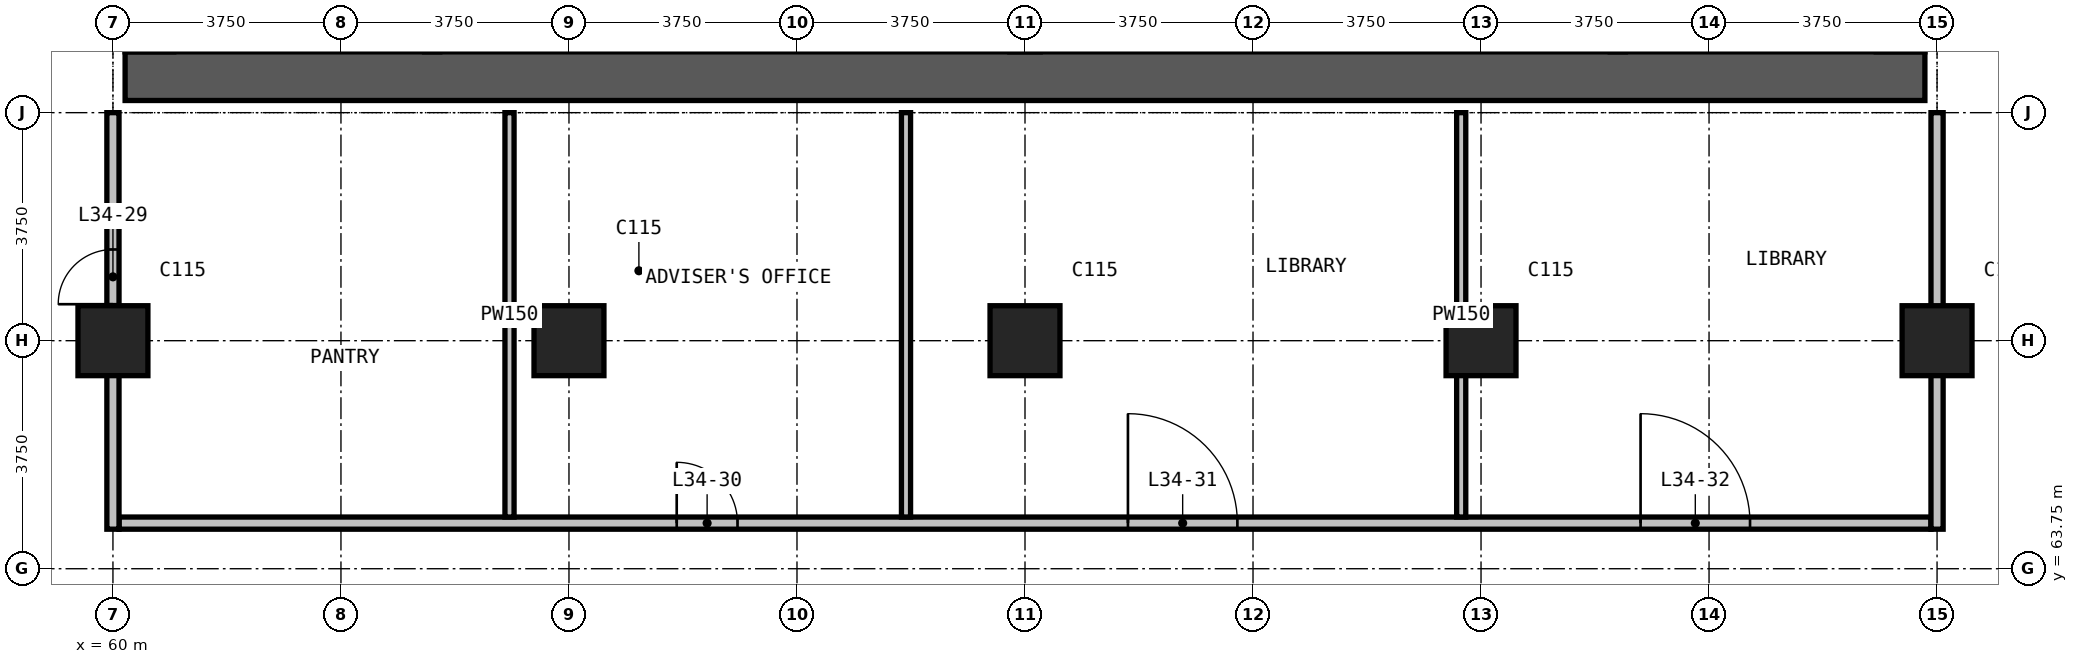
"""IFC4 building model, lengths in metres.
Left out: names, types, materials, properties, quantities, classifications, styles, units other than length and angle.
Written with IfcOpenShell. Run it as: python <this file> out.ifc"""

import sys

from ifc_helpers import new_model, si_unit, direction, frame, frame_2d, origin, origin_2d, place, context, subcontext, project, spatial, rectangle, extrude, element, fill, save


model = new_model("IFC4")
c1 = context("Model", 3, precision=1e-05, world=origin(), true_north=direction((0.0, 1.0)))
c2 = subcontext(c1, "Body", "Model", "MODEL_VIEW")
j1 = project(units=[si_unit("LENGTHUNIT", "METRE"), si_unit("PLANEANGLEUNIT", "RADIAN")], contexts=[c1])
p1 = place(None, origin())
s1 = spatial("IfcSite", under=j1, at=p1, CompositionType="ELEMENT")
p2 = place(p1, origin())
s2 = spatial("IfcBuilding", under=s1, at=p2, CompositionType="ELEMENT")
p3 = place(p2, frame((0.0, 0.0, 136.0)))
s3 = spatial("IfcBuildingStorey", under=s2, at=p3, CompositionType="ELEMENT", Elevation=136.0)
for number, where, z_axis, x_axis in (
    (1, (60.0, 67.5, 0.0), (0.0, 0.0, 1.0), (1.0, 0.0, 0.0)),
    (2, (67.5, 67.5, 0.0), (0.0, 0.0, 1.0), (1.0, 0.0, 0.0)),
    (3, (75.0, 67.5, 0.0), (0.0, 0.0, 1.0), (1.0, 0.0, 0.0)),
    (4, (82.5, 67.5, 0.0), (0.0, 0.0, 1.0), (1.0, 0.0, 0.0)),
    (5, (90.0, 67.5, 0.0), (0.0, 0.0, 1.0), (1.0, 0.0, 0.0)),
):
    element("IfcColumn", number, at=place(p3, frame(where, z_axis=z_axis, x_axis=x_axis)), inside=s3, PredefinedType="COLUMN", context=c2, shape_type="SweptSolid", body=[
        extrude(rectangle(XDim=1.15, YDim=1.15, at=origin_2d()), origin(), (0.0, 0.0, 1.0), 3.6),
    ])
p4 = place(p3, frame((60.2, 71.85, 0.0), z_axis=(0.0, 0.0, 1.0), x_axis=(1.0, 0.0, 0.0)))
e6 = element("IfcWall", 6, at=p4, inside=s3, PredefinedType="SHEAR", context=c2, shape_type="SweptSolid", body=[
    extrude(rectangle(XDim=29.6, YDim=0.8, at=frame_2d((14.8, 0.0))), origin(), (0.0, 0.0, 1.0), 3.6),
])
p5 = place(p3, frame((60.1, 64.5, 0.0), z_axis=(0.0, 0.0, 1.0), x_axis=(1.0, 0.0, 0.0)))
e7 = element("IfcWall", 7, at=p5, inside=s3, PredefinedType="PARTITIONING", context=c2, shape_type="SweptSolid", body=[
    extrude(rectangle(XDim=29.8, YDim=0.2, at=frame_2d((14.9, 0.0))), origin(), (0.0, 0.0, 1.0), 3.3),
])
p6 = place(p5, frame((9.172, 0.0, 0.0)))
e8 = element("IfcOpeningElement", 8, at=p6, cuts=e7, PredefinedType="OPENING", context=c2, shape_type="SweptSolid", body=[
    extrude(rectangle(XDim=1.0, YDim=2.2, at=frame_2d((0.5, 1.1))), frame((0.0, 0.11, 0.0), z_axis=(0.0, -1.0, 0.0), x_axis=(1.0, 0.0, 0.0)), (0.0, 0.0, 1.0), 0.22),
])
p7 = place(p5, frame((16.593, 0.0, 0.0)))
e9 = element("IfcOpeningElement", 9, at=p7, cuts=e7, PredefinedType="OPENING", context=c2, shape_type="SweptSolid", body=[
    extrude(rectangle(XDim=1.8, YDim=2.2, at=frame_2d((0.9, 1.1))), frame((0.0, 0.11, 0.0), z_axis=(0.0, -1.0, 0.0), x_axis=(1.0, 0.0, 0.0)), (0.0, 0.0, 1.0), 0.22),
])
p8 = place(p5, frame((25.024, 0.0, 0.0)))
e10 = element("IfcOpeningElement", 10, at=p8, cuts=e7, PredefinedType="OPENING", context=c2, shape_type="SweptSolid", body=[
    extrude(rectangle(XDim=1.8, YDim=2.2, at=frame_2d((0.9, 1.1))), frame((0.0, 0.11, 0.0), z_axis=(0.0, -1.0, 0.0), x_axis=(1.0, 0.0, 0.0)), (0.0, 0.0, 1.0), 0.22),
])
p9 = place(p3, frame((60.0, 64.4, 0.0), z_axis=(0.0, 0.0, 1.0), x_axis=(0.0, 1.0, 0.0)))
e11 = element("IfcWall", 11, at=p9, inside=s3, PredefinedType="PARTITIONING", context=c2, shape_type="SweptSolid", body=[
    extrude(rectangle(XDim=6.85, YDim=0.2, at=frame_2d((3.425, 0.0))), origin(), (0.0, 0.0, 1.0), 3.3),
])
p10 = place(p9, frame((3.7, 0.0, 0.0)))
e12 = element("IfcOpeningElement", 12, at=p10, cuts=e11, PredefinedType="OPENING", context=c2, shape_type="SweptSolid", body=[
    extrude(rectangle(XDim=0.9, YDim=2.2, at=frame_2d((0.45, 1.1))), frame((0.0, 0.11, 0.0), z_axis=(0.0, -1.0, 0.0), x_axis=(1.0, 0.0, 0.0)), (0.0, 0.0, 1.0), 0.22),
])
p11 = place(p3, frame((90.0, 64.4, 0.0), z_axis=(0.0, 0.0, 1.0), x_axis=(0.0, 1.0, 0.0)))
e13 = element("IfcWall", 13, at=p11, inside=s3, PredefinedType="PARTITIONING", context=c2, shape_type="SweptSolid", body=[
    extrude(rectangle(XDim=6.85, YDim=0.2, at=frame_2d((3.425, 0.0))), origin(), (0.0, 0.0, 1.0), 3.3),
])
for number, where, z_axis, x_axis in (
    (14, (66.522, 64.6, 0.0), (0.0, 0.0, 1.0), (0.0, 1.0, 0.0)),
    (15, (73.043, 64.6, 0.0), (0.0, 0.0, 1.0), (0.0, 1.0, 0.0)),
    (16, (82.174, 64.6, 0.0), (0.0, 0.0, 1.0), (0.0, 1.0, 0.0)),
):
    element("IfcWall", number, at=place(p3, frame(where, z_axis=z_axis, x_axis=x_axis)), inside=s3, PredefinedType="PARTITIONING", context=c2, shape_type="SweptSolid", body=[
        extrude(rectangle(XDim=6.65, YDim=0.15, at=frame_2d((3.325, 0.0))), origin(), (0.0, 0.0, 1.0), 3.3),
    ])
p12 = place(p10, origin())
e17 = element("IfcDoor", 17, at=p12, inside=s3, OperationType="SINGLE_SWING_LEFT", PredefinedType="DOOR", context=c2, shape_type="SweptSolid", body=[
    extrude(rectangle(XDim=0.9, YDim=2.2, at=frame_2d((0.45, 1.1))), frame((0.0, 0.025, 0.0), z_axis=(0.0, -1.0, 0.0), x_axis=(1.0, 0.0, 0.0)), (0.0, 0.0, 1.0), 0.05),
])
fill(e12, e17)
p13 = place(p6, origin())
e18 = element("IfcDoor", 18, at=p13, inside=s3, OperationType="SINGLE_SWING_LEFT", PredefinedType="DOOR", context=c2, shape_type="SweptSolid", body=[
    extrude(rectangle(XDim=1.0, YDim=2.2, at=frame_2d((0.5, 1.1))), frame((0.0, 0.025, 0.0), z_axis=(0.0, -1.0, 0.0), x_axis=(1.0, 0.0, 0.0)), (0.0, 0.0, 1.0), 0.05),
])
fill(e8, e18)
p14 = place(p7, origin())
e19 = element("IfcDoor", 19, at=p14, inside=s3, OperationType="DOUBLE_DOOR_SINGLE_SWING", PredefinedType="DOOR", context=c2, shape_type="SweptSolid", body=[
    extrude(rectangle(XDim=1.8, YDim=2.2, at=frame_2d((0.9, 1.1))), frame((0.0, 0.025, 0.0), z_axis=(0.0, -1.0, 0.0), x_axis=(1.0, 0.0, 0.0)), (0.0, 0.0, 1.0), 0.05),
])
fill(e9, e19)
p15 = place(p8, origin())
e20 = element("IfcDoor", 20, at=p15, inside=s3, OperationType="DOUBLE_DOOR_SINGLE_SWING", PredefinedType="DOOR", context=c2, shape_type="SweptSolid", body=[
    extrude(rectangle(XDim=1.8, YDim=2.2, at=frame_2d((0.9, 1.1))), frame((0.0, 0.025, 0.0), z_axis=(0.0, -1.0, 0.0), x_axis=(1.0, 0.0, 0.0)), (0.0, 0.0, 1.0), 0.05),
])
fill(e10, e20)
save(model, sys.argv[1])
